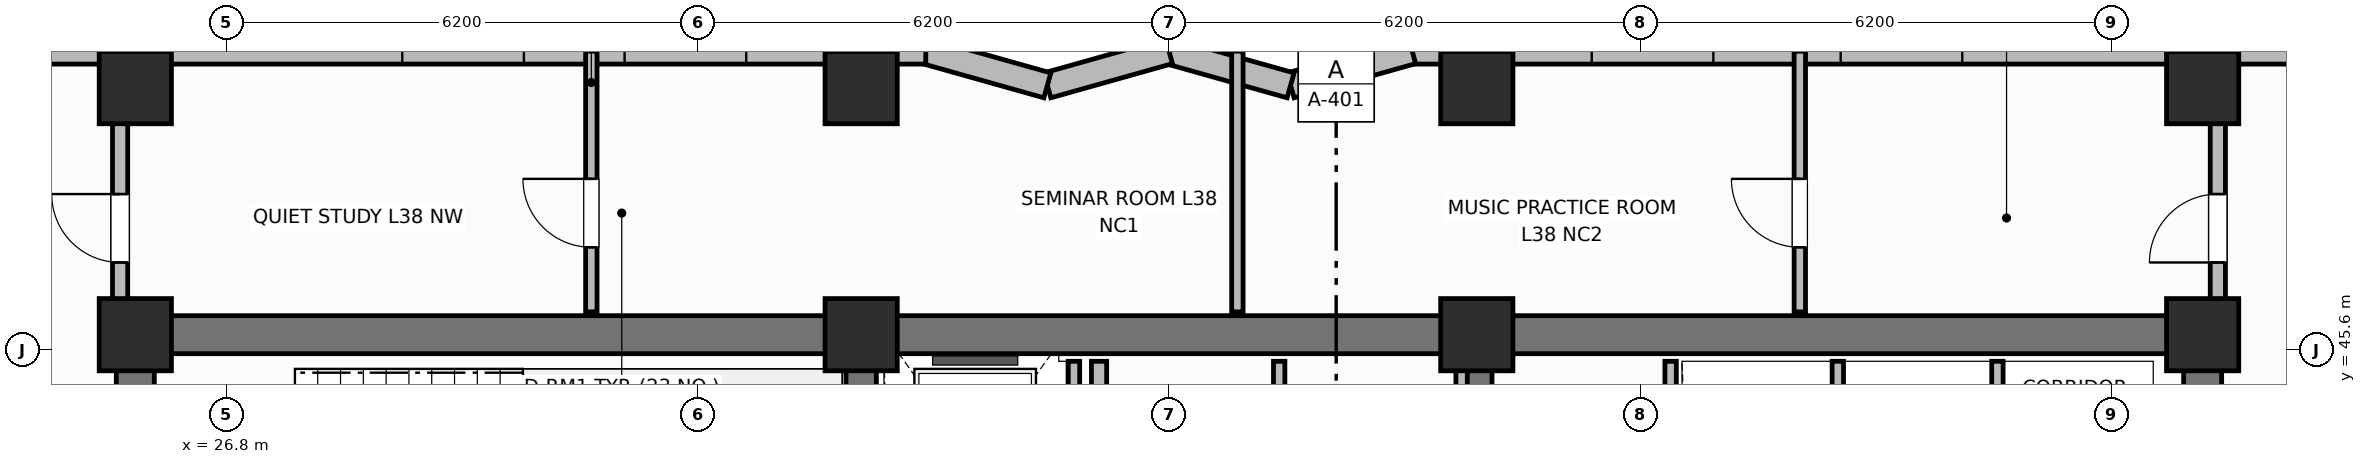
"""IFC4 building model, lengths in metres.
Left out: names, types, materials, properties, quantities, classifications, styles, units other than length and angle.
Written with IfcOpenShell. Run it as: python <this file> out.ifc"""

import sys

from ifc_helpers import new_model, si_unit, direction, frame, frame_2d, origin, origin_2d, place, context, subcontext, project, spatial, rectangle, extrude, element, fill, save


model = new_model("IFC4")
c1 = context("Model", 3, precision=1e-05, world=origin(), true_north=direction((0.0, 1.0)))
c2 = subcontext(c1, "Body", "Model", "MODEL_VIEW")
j1 = project(units=[si_unit("LENGTHUNIT", "METRE"), si_unit("PLANEANGLEUNIT", "RADIAN")], contexts=[c1])
p1 = place(None, origin())
s1 = spatial("IfcSite", under=j1, at=p1, CompositionType="ELEMENT")
p2 = place(p1, origin())
s2 = spatial("IfcBuilding", under=s1, at=p2, CompositionType="ELEMENT")
p3 = place(p2, frame((0.0, 0.0, 155.2)))
s3 = spatial("IfcBuildingStorey", under=s2, at=p3, CompositionType="ELEMENT", Elevation=155.2)
p4 = place(p3, frame((25.6, 45.8, 0.0), z_axis=(0.0, 0.0, 1.0), x_axis=(1.0, 0.0, 0.0)))
e1 = element("IfcWall", 1, at=p4, inside=s3, PredefinedType="SHEAR", context=c2, shape_type="SweptSolid", body=[
    extrude(rectangle(XDim=27.2, YDim=0.5, at=frame_2d((13.6, 0.0))), origin(), (0.0, 0.0, 1.0), 3.7),
])
for number, where, z_axis, x_axis in (
    (2, (25.6, 39.85, 0.0), (0.0, 0.0, 1.0), (0.0, 1.0, 0.0)),
    (3, (52.8, 39.85, 0.0), (0.0, 0.0, 1.0), (0.0, 1.0, 0.0)),
):
    element("IfcWall", number, at=place(p3, frame(where, z_axis=z_axis, x_axis=x_axis)), inside=s3, PredefinedType="SHEAR", context=c2, shape_type="SweptSolid", body=[
        extrude(rectangle(XDim=5.7, YDim=0.5, at=frame_2d((2.85, 0.0))), origin(), (0.0, 0.0, 1.0), 3.7),
    ])
for number, where, z_axis, x_axis in (
    (4, (35.15, 39.85, 0.0), (0.0, 0.0, 1.0), (0.0, 1.0, 0.0)),
    (5, (43.25, 39.85, 0.0), (0.0, 0.0, 1.0), (0.0, 1.0, 0.0)),
):
    element("IfcWall", number, at=place(p3, frame(where, z_axis=z_axis, x_axis=x_axis)), inside=s3, PredefinedType="SHEAR", context=c2, shape_type="SweptSolid", body=[
        extrude(rectangle(XDim=5.7, YDim=0.4, at=frame_2d((2.85, 0.0))), origin(), (0.0, 0.0, 1.0), 3.7),
    ])
for number, where, z_axis, x_axis in (
    (6, (25.6, 45.8, 0.0), (0.0, 0.0, 1.0), (1.0, 0.0, 0.0)),
    (7, (35.15, 45.8, 0.0), (0.0, 0.0, 1.0), (1.0, 0.0, 0.0)),
    (8, (43.25, 45.8, 0.0), (0.0, 0.0, 1.0), (1.0, 0.0, 0.0)),
    (9, (52.8, 45.8, 0.0), (0.0, 0.0, 1.0), (1.0, 0.0, 0.0)),
    (10, (25.6, 49.05, 0.0), (0.0, 0.0, 1.0), (1.0, 0.0, 0.0)),
    (11, (35.15, 49.05, 0.0), (0.0, 0.0, 1.0), (1.0, 0.0, 0.0)),
    (12, (43.25, 49.05, 0.0), (0.0, 0.0, 1.0), (1.0, 0.0, 0.0)),
    (13, (52.8, 49.05, 0.0), (0.0, 0.0, 1.0), (1.0, 0.0, 0.0)),
):
    element("IfcColumn", number, at=place(p3, frame(where, z_axis=z_axis, x_axis=x_axis)), inside=s3, PredefinedType="COLUMN", context=c2, shape_type="SweptSolid", body=[
        extrude(rectangle(XDim=0.95, YDim=0.95, at=origin_2d()), origin(), (0.0, 0.0, 1.0), 3.7),
    ])
p5 = place(p3, frame((58.2, 49.53, 0.0), z_axis=(0.0, 0.0, 1.0), x_axis=(-1.0, 0.0, 0.0)))
e14 = element("IfcWall", 14, at=p5, inside=s3, PredefinedType="SOLIDWALL", context=c2, shape_type="SweptSolid", body=[
    extrude(rectangle(XDim=15.8, YDim=0.34, at=frame_2d((7.9, 0.0))), origin(), (0.0, 0.0, 1.0), 2.72),
])
p6 = place(p5, frame((1.312, 0.0, 0.7)))
e15 = element("IfcOpeningElement", 15, at=p6, cuts=e14, PredefinedType="OPENING", context=c2, shape_type="SweptSolid", body=[
    extrude(rectangle(XDim=1.6, YDim=1.9, at=frame_2d((0.8, 0.95))), frame((0.0, 0.18, 0.0), z_axis=(0.0, -1.0, 0.0), x_axis=(1.0, 0.0, 0.0)), (0.0, 0.0, 1.0), 0.36),
])
p7 = place(p5, frame((8.562, 0.0, 0.7)))
e16 = element("IfcOpeningElement", 16, at=p7, cuts=e14, PredefinedType="OPENING", context=c2, shape_type="SweptSolid", body=[
    extrude(rectangle(XDim=1.6, YDim=1.9, at=frame_2d((0.8, 0.95))), frame((0.0, 0.18, 0.0), z_axis=(0.0, -1.0, 0.0), x_axis=(1.0, 0.0, 0.0)), (0.0, 0.0, 1.0), 0.36),
])
p8 = place(p5, frame((11.837, 0.0, 0.7)))
e17 = element("IfcOpeningElement", 17, at=p8, cuts=e14, PredefinedType="OPENING", context=c2, shape_type="SweptSolid", body=[
    extrude(rectangle(XDim=1.6, YDim=1.9, at=frame_2d((0.8, 0.95))), frame((0.0, 0.18, 0.0), z_axis=(0.0, -1.0, 0.0), x_axis=(1.0, 0.0, 0.0)), (0.0, 0.0, 1.0), 0.36),
])
p9 = place(p3, frame((42.4, 49.53, 0.0), z_axis=(0.0, 0.0, 1.0), x_axis=(-0.962652136636, -0.270741322725, 0.0)))
e18 = element("IfcWall", 18, at=p9, inside=s3, PredefinedType="SOLIDWALL", context=c2, shape_type="SweptSolid", body=[
    extrude(rectangle(XDim=1.662, YDim=0.34, at=frame_2d((0.831, 0.0))), origin(), (0.0, 0.0, 1.0), 2.72),
])
p10 = place(p3, frame((40.8, 49.08, 0.0), z_axis=(0.0, 0.0, 1.0), x_axis=(-0.962662902433, 0.270703040766, 0.0)))
e19 = element("IfcWall", 19, at=p10, inside=s3, PredefinedType="SOLIDWALL", context=c2, shape_type="SweptSolid", body=[
    extrude(rectangle(XDim=1.662, YDim=0.34, at=frame_2d((0.831, 0.0))), origin(), (0.0, 0.0, 1.0), 2.72),
])
p11 = place(p3, frame((39.2, 49.53, 0.0), z_axis=(0.0, 0.0, 1.0), x_axis=(-0.962652136636, -0.270741322725, 0.0)))
e20 = element("IfcWall", 20, at=p11, inside=s3, PredefinedType="SOLIDWALL", context=c2, shape_type="SweptSolid", body=[
    extrude(rectangle(XDim=1.662, YDim=0.34, at=frame_2d((0.831, 0.0))), origin(), (0.0, 0.0, 1.0), 2.72),
])
p12 = place(p3, frame((37.6, 49.08, 0.0), z_axis=(0.0, 0.0, 1.0), x_axis=(-0.962662902433, 0.270703040766, 0.0)))
e21 = element("IfcWall", 21, at=p12, inside=s3, PredefinedType="SOLIDWALL", context=c2, shape_type="SweptSolid", body=[
    extrude(rectangle(XDim=1.662, YDim=0.34, at=frame_2d((0.831, 0.0))), origin(), (0.0, 0.0, 1.0), 2.72),
])
p13 = place(p3, frame((36.0, 49.53, 0.0), z_axis=(0.0, 0.0, 1.0), x_axis=(-1.0, 0.0, 0.0)))
e22 = element("IfcWall", 22, at=p13, inside=s3, PredefinedType="SOLIDWALL", context=c2, shape_type="SweptSolid", body=[
    extrude(rectangle(XDim=15.8, YDim=0.34, at=frame_2d((7.9, 0.0))), origin(), (0.0, 0.0, 1.0), 2.72),
])
p14 = place(p13, frame((2.363, 0.0, 0.7)))
e23 = element("IfcOpeningElement", 23, at=p14, cuts=e22, PredefinedType="OPENING", context=c2, shape_type="SweptSolid", body=[
    extrude(rectangle(XDim=1.6, YDim=1.9, at=frame_2d((0.8, 0.95))), frame((0.0, 0.18, 0.0), z_axis=(0.0, -1.0, 0.0), x_axis=(1.0, 0.0, 0.0)), (0.0, 0.0, 1.0), 0.36),
])
p15 = place(p13, frame((5.288, 0.0, 0.7)))
e24 = element("IfcOpeningElement", 24, at=p15, cuts=e22, PredefinedType="OPENING", context=c2, shape_type="SweptSolid", body=[
    extrude(rectangle(XDim=1.6, YDim=1.9, at=frame_2d((0.8, 0.95))), frame((0.0, 0.18, 0.0), z_axis=(0.0, -1.0, 0.0), x_axis=(1.0, 0.0, 0.0)), (0.0, 0.0, 1.0), 0.36),
])
p16 = place(p13, frame((13.238, 0.0, 0.7)))
e25 = element("IfcOpeningElement", 25, at=p16, cuts=e22, PredefinedType="OPENING", context=c2, shape_type="SweptSolid", body=[
    extrude(rectangle(XDim=1.6, YDim=1.9, at=frame_2d((0.8, 0.95))), frame((0.0, 0.18, 0.0), z_axis=(0.0, -1.0, 0.0), x_axis=(1.0, 0.0, 0.0)), (0.0, 0.0, 1.0), 0.36),
])
p17 = place(p3, frame((37.95, 42.6, 0.0), z_axis=(0.0, 0.0, 1.0), x_axis=(0.0, 1.0, 0.0)))
e26 = element("IfcWall", 26, at=p17, inside=s3, PredefinedType="PARTITIONING", context=c2, shape_type="SweptSolid", body=[
    extrude(rectangle(XDim=2.85, YDim=0.15, at=frame_2d((1.425, 0.0))), origin(), (0.0, 0.0, 1.0), 2.55),
])
p18 = place(p3, frame((38.28, 39.82, 0.0), z_axis=(0.0, 0.0, 1.0), x_axis=(0.0, 1.0, 0.0)))
e27 = element("IfcWall", 27, at=p18, inside=s3, PredefinedType="PARTITIONING", context=c2, shape_type="SweptSolid", body=[
    extrude(rectangle(XDim=5.63, YDim=0.2, at=frame_2d((2.815, 0.0))), origin(), (0.0, 0.0, 1.0), 2.55),
])
for number, where, z_axis, x_axis in (
    (28, (43.05, 39.82, 0.0), (0.0, 0.0, 1.0), (0.0, 1.0, 0.0)),
    (29, (40.65, 39.82, 0.0), (0.0, 0.0, 1.0), (0.0, 1.0, 0.0)),
    (30, (45.8, 39.82, 0.0), (0.0, 0.0, 1.0), (0.0, 1.0, 0.0)),
):
    element("IfcWall", number, at=place(p3, frame(where, z_axis=z_axis, x_axis=x_axis)), inside=s3, PredefinedType="PARTITIONING", context=c2, shape_type="SweptSolid", body=[
        extrude(rectangle(XDim=5.63, YDim=0.15, at=frame_2d((2.815, 0.0))), origin(), (0.0, 0.0, 1.0), 2.55),
    ])
for number, where, z_axis, x_axis in (
    (31, (48.0, 42.65, 0.0), (0.0, 0.0, 1.0), (0.0, 1.0, 0.0)),
    (32, (50.1, 42.65, 0.0), (0.0, 0.0, 1.0), (0.0, 1.0, 0.0)),
):
    element("IfcWall", number, at=place(p3, frame(where, z_axis=z_axis, x_axis=x_axis)), inside=s3, PredefinedType="PARTITIONING", context=c2, shape_type="SweptSolid", body=[
        extrude(rectangle(XDim=2.8, YDim=0.15, at=frame_2d((1.4, 0.0))), origin(), (0.0, 0.0, 1.0), 2.55),
    ])
p19 = place(p3, frame((31.6, 46.1, 0.0), z_axis=(0.0, 0.0, 1.0), x_axis=(0.0, 1.0, 0.0)))
e33 = element("IfcWall", 33, at=p19, inside=s3, PredefinedType="PARTITIONING", context=c2, shape_type="SweptSolid", body=[
    extrude(rectangle(XDim=3.43, YDim=0.15, at=frame_2d((1.715, 0.0))), origin(), (0.0, 0.0, 1.0), 2.55),
])
p20 = place(p19, frame((0.85, 0.0, 0.0)))
e34 = element("IfcOpeningElement", 34, at=p20, cuts=e33, PredefinedType="OPENING", context=c2, shape_type="SweptSolid", body=[
    extrude(rectangle(XDim=0.9, YDim=2.1, at=frame_2d((0.45, 1.05))), frame((0.0, 0.085, 0.0), z_axis=(0.0, -1.0, 0.0), x_axis=(1.0, 0.0, 0.0)), (0.0, 0.0, 1.0), 0.17),
])
p21 = place(p3, frame((40.1, 46.1, 0.0), z_axis=(0.0, 0.0, 1.0), x_axis=(0.0, 1.0, 0.0)))
e35 = element("IfcWall", 35, at=p21, inside=s3, PredefinedType="PARTITIONING", context=c2, shape_type="SweptSolid", body=[
    extrude(rectangle(XDim=3.43, YDim=0.15, at=frame_2d((1.715, 0.0))), origin(), (0.0, 0.0, 1.0), 2.55),
])
p22 = place(p3, frame((47.5, 46.1, 0.0), z_axis=(0.0, 0.0, 1.0), x_axis=(0.0, 1.0, 0.0)))
e36 = element("IfcWall", 36, at=p22, inside=s3, PredefinedType="PARTITIONING", context=c2, shape_type="SweptSolid", body=[
    extrude(rectangle(XDim=3.43, YDim=0.15, at=frame_2d((1.715, 0.0))), origin(), (0.0, 0.0, 1.0), 2.55),
])
p23 = place(p22, frame((0.85, 0.0, 0.0)))
e37 = element("IfcOpeningElement", 37, at=p23, cuts=e36, PredefinedType="OPENING", context=c2, shape_type="SweptSolid", body=[
    extrude(rectangle(XDim=0.9, YDim=2.1, at=frame_2d((0.45, 1.05))), frame((0.0, 0.085, 0.0), z_axis=(0.0, -1.0, 0.0), x_axis=(1.0, 0.0, 0.0)), (0.0, 0.0, 1.0), 0.17),
])
p24 = place(p3, frame((25.4, 46.1, 0.0), z_axis=(0.0, 0.0, 1.0), x_axis=(0.0, 1.0, 0.0)))
e38 = element("IfcWall", 38, at=p24, inside=s3, PredefinedType="PARTITIONING", context=c2, shape_type="SweptSolid", body=[
    extrude(rectangle(XDim=2.48, YDim=0.2, at=frame_2d((1.24, 0.0))), origin(), (0.0, 0.0, 1.0), 2.55),
])
p25 = place(p24, frame((0.65, 0.0, 0.0)))
e39 = element("IfcOpeningElement", 39, at=p25, cuts=e38, PredefinedType="OPENING", context=c2, shape_type="SweptSolid", body=[
    extrude(rectangle(XDim=0.9, YDim=2.1, at=frame_2d((0.45, 1.05))), frame((0.0, 0.11, 0.0), z_axis=(0.0, -1.0, 0.0), x_axis=(1.0, 0.0, 0.0)), (0.0, 0.0, 1.0), 0.22),
])
p26 = place(p3, frame((53.0, 46.1, 0.0), z_axis=(0.0, 0.0, 1.0), x_axis=(0.0, 1.0, 0.0)))
e40 = element("IfcWall", 40, at=p26, inside=s3, PredefinedType="PARTITIONING", context=c2, shape_type="SweptSolid", body=[
    extrude(rectangle(XDim=2.48, YDim=0.2, at=frame_2d((1.24, 0.0))), origin(), (0.0, 0.0, 1.0), 2.55),
])
p27 = place(p26, frame((0.65, 0.0, 0.0)))
e41 = element("IfcOpeningElement", 41, at=p27, cuts=e40, PredefinedType="OPENING", context=c2, shape_type="SweptSolid", body=[
    extrude(rectangle(XDim=0.9, YDim=2.1, at=frame_2d((0.45, 1.05))), frame((0.0, 0.11, 0.0), z_axis=(0.0, -1.0, 0.0), x_axis=(1.0, 0.0, 0.0)), (0.0, 0.0, 1.0), 0.22),
])
p28 = place(p7, origin())
e42 = element("IfcWindow", 42, at=p28, inside=s3, PartitioningType="SINGLE_PANEL", PredefinedType="WINDOW", context=c2, shape_type="SweptSolid", body=[
    extrude(rectangle(XDim=1.6, YDim=1.9, at=frame_2d((0.8, 0.95))), frame((0.0, 0.03, 0.0), z_axis=(0.0, -1.0, 0.0), x_axis=(1.0, 0.0, 0.0)), (0.0, 0.0, 1.0), 0.06),
])
fill(e16, e42)
p29 = place(p8, origin())
e43 = element("IfcWindow", 43, at=p29, inside=s3, PartitioningType="SINGLE_PANEL", PredefinedType="WINDOW", context=c2, shape_type="SweptSolid", body=[
    extrude(rectangle(XDim=1.6, YDim=1.9, at=frame_2d((0.8, 0.95))), frame((0.0, 0.03, 0.0), z_axis=(0.0, -1.0, 0.0), x_axis=(1.0, 0.0, 0.0)), (0.0, 0.0, 1.0), 0.06),
])
fill(e17, e43)
p30 = place(p14, origin())
e44 = element("IfcWindow", 44, at=p30, inside=s3, PartitioningType="SINGLE_PANEL", PredefinedType="WINDOW", context=c2, shape_type="SweptSolid", body=[
    extrude(rectangle(XDim=1.6, YDim=1.9, at=frame_2d((0.8, 0.95))), frame((0.0, 0.03, 0.0), z_axis=(0.0, -1.0, 0.0), x_axis=(1.0, 0.0, 0.0)), (0.0, 0.0, 1.0), 0.06),
])
fill(e23, e44)
p31 = place(p15, origin())
e45 = element("IfcWindow", 45, at=p31, inside=s3, PartitioningType="SINGLE_PANEL", PredefinedType="WINDOW", context=c2, shape_type="SweptSolid", body=[
    extrude(rectangle(XDim=1.6, YDim=1.9, at=frame_2d((0.8, 0.95))), frame((0.0, 0.03, 0.0), z_axis=(0.0, -1.0, 0.0), x_axis=(1.0, 0.0, 0.0)), (0.0, 0.0, 1.0), 0.06),
])
fill(e24, e45)
p32 = place(p20, origin())
e46 = element("IfcDoor", 46, at=p32, inside=s3, OperationType="SINGLE_SWING_RIGHT", PredefinedType="DOOR", context=c2, shape_type="SweptSolid", body=[
    extrude(rectangle(XDim=0.9, YDim=2.1, at=frame_2d((0.45, 1.05))), frame((0.0, 0.025, 0.0), z_axis=(0.0, -1.0, 0.0), x_axis=(1.0, 0.0, 0.0)), (0.0, 0.0, 1.0), 0.05),
])
fill(e34, e46)
p33 = place(p23, origin())
e47 = element("IfcDoor", 47, at=p33, inside=s3, OperationType="SINGLE_SWING_RIGHT", PredefinedType="DOOR", context=c2, shape_type="SweptSolid", body=[
    extrude(rectangle(XDim=0.9, YDim=2.1, at=frame_2d((0.45, 1.05))), frame((0.0, 0.025, 0.0), z_axis=(0.0, -1.0, 0.0), x_axis=(1.0, 0.0, 0.0)), (0.0, 0.0, 1.0), 0.05),
])
fill(e37, e47)
p34 = place(p25, origin())
e48 = element("IfcDoor", 48, at=p34, inside=s3, OperationType="SINGLE_SWING_RIGHT", PredefinedType="DOOR", context=c2, shape_type="SweptSolid", body=[
    extrude(rectangle(XDim=0.9, YDim=2.1, at=frame_2d((0.45, 1.05))), frame((0.0, 0.025, 0.0), z_axis=(0.0, -1.0, 0.0), x_axis=(1.0, 0.0, 0.0)), (0.0, 0.0, 1.0), 0.05),
])
fill(e39, e48)
p35 = place(p27, origin())
e49 = element("IfcDoor", 49, at=p35, inside=s3, OperationType="SINGLE_SWING_LEFT", PredefinedType="DOOR", context=c2, shape_type="SweptSolid", body=[
    extrude(rectangle(XDim=0.9, YDim=2.1, at=frame_2d((0.45, 1.05))), frame((0.0, 0.025, 0.0), z_axis=(0.0, -1.0, 0.0), x_axis=(1.0, 0.0, 0.0)), (0.0, 0.0, 1.0), 0.05),
])
fill(e41, e49)
save(model, sys.argv[1])
